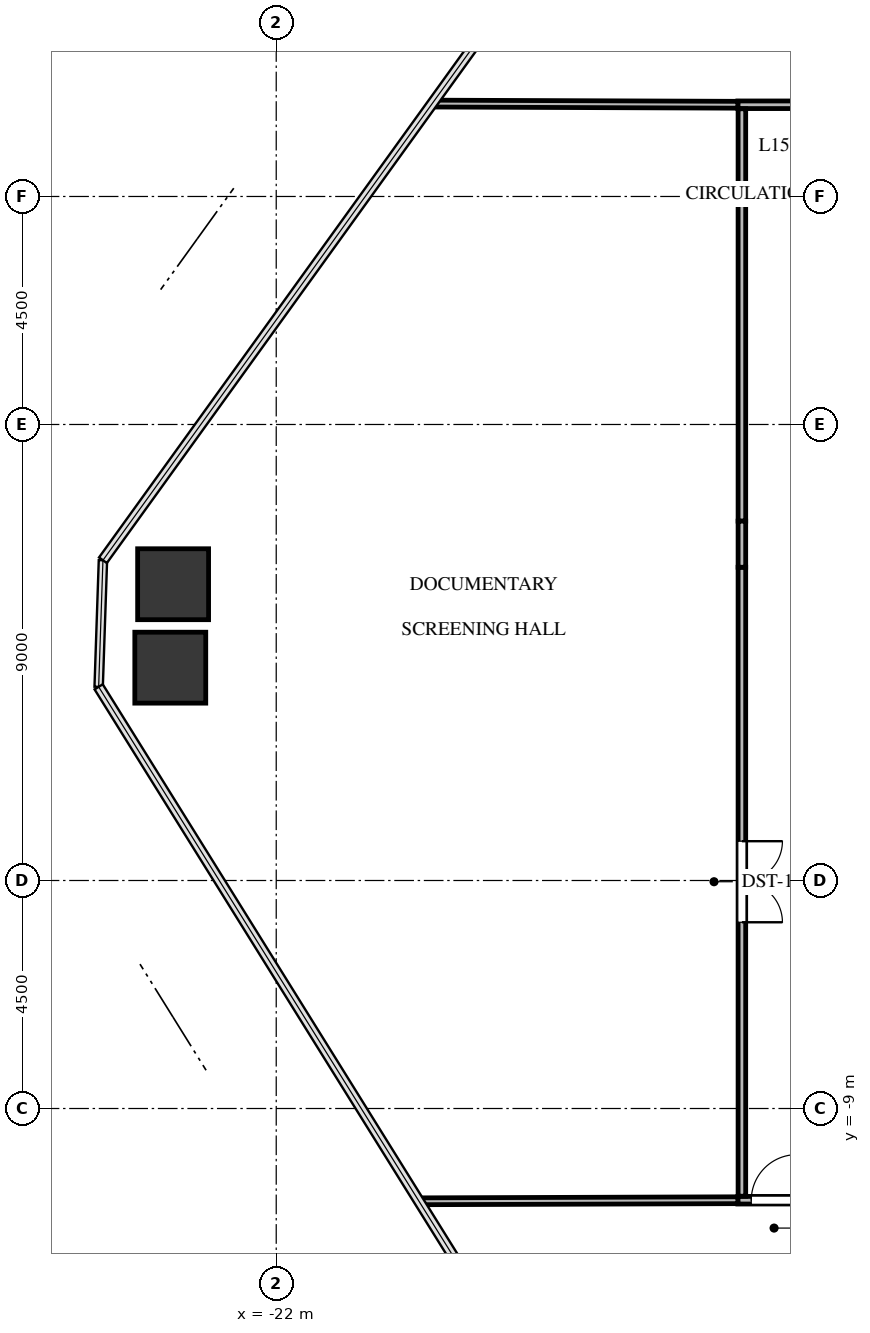
"""IFC4 building model, lengths in metres.
Left out: names, types, materials, properties, quantities, classifications, styles, units other than length and angle.
Written with IfcOpenShell. Run it as: python <this file> out.ifc"""

import sys

from ifc_helpers import new_model, si_unit, direction, frame, frame_2d, origin, origin_2d, place, context, subcontext, project, spatial, rectangle, extrude, source, transform, mapped, element, fill, save


model = new_model("IFC4")
c1 = context("Model", 3, precision=1e-05, world=origin(), true_north=direction((0.0, 1.0)))
c2 = subcontext(c1, "Body", "Model", "MODEL_VIEW")
j1 = project(units=[si_unit("LENGTHUNIT", "METRE"), si_unit("PLANEANGLEUNIT", "RADIAN")], contexts=[c1])
p1 = place(None, origin())
s1 = spatial("IfcSite", under=j1, at=p1, CompositionType="ELEMENT")
p2 = place(p1, origin())
s2 = spatial("IfcBuilding", under=s1, at=p2, CompositionType="ELEMENT")
p3 = place(p2, frame((0.0, 0.0, 62.1)))
s3 = spatial("IfcBuildingStorey", under=s2, at=p3, CompositionType="ELEMENT", Elevation=62.1)
m1 = source(origin(), c2, "Body", "SweptSolid", [
    extrude(rectangle(XDim=1.4, YDim=1.4, at=origin_2d()), origin(), (0.0, 0.0, 1.0), 3.3),
])
for number, where, z_axis, x_axis in (
    (1, (-24.091, -0.3, -0.24), (0.0, 0.0, 1.0), (1.0, 0.0, 0.0)),
    (2, (-24.035, 1.347, -0.24), (0.0, 0.0, 1.0), (1.0, 0.0, 0.0)),
):
    element("IfcColumn", number, at=place(p3, frame(where, z_axis=z_axis, x_axis=x_axis)), inside=s3, PredefinedType="COLUMN", context=c2, shape_type="MappedRepresentation", body=[
        mapped(m1, transform((0.0, 0.0, 0.0), x_axis=(1.0, 0.0, 0.0), y_axis=(0.0, 1.0, 0.0), z_axis=(0.0, 0.0, 1.0), scale=1.0)),
    ])
p4 = place(p3, frame((-10.72, 10.81, 0.0), z_axis=(0.0, 0.0, 1.0), x_axis=(-1.0, 0.0, 0.0)))
e3 = element("IfcWall", 3, at=p4, inside=s3, PredefinedType="PARTITIONING", context=c2, shape_type="SweptSolid", body=[
    extrude(rectangle(XDim=2.17, YDim=0.15, at=frame_2d((1.085, 0.0))), origin(), (0.0, 0.0, 1.0), 3.045),
])
p5 = place(p3, frame((-12.89, -10.81, 0.0), z_axis=(0.0, 0.0, 1.0), x_axis=(1.0, 0.0, 0.0)))
e4 = element("IfcWall", 4, at=p5, inside=s3, PredefinedType="PARTITIONING", context=c2, shape_type="SweptSolid", body=[
    extrude(rectangle(XDim=1.43, YDim=0.15, at=frame_2d((0.715, 0.0))), origin(), (0.0, 0.0, 1.0), 3.045),
])
p6 = place(p5, frame((0.265, 0.0, 0.0)))
e5 = element("IfcOpeningElement", 5, at=p6, cuts=e4, PredefinedType="OPENING", context=c2, shape_type="SweptSolid", body=[
    extrude(rectangle(XDim=0.9, YDim=2.05, at=frame_2d((0.45, 1.025))), frame((0.0, 0.085, 0.0), z_axis=(0.0, -1.0, 0.0), x_axis=(1.0, 0.0, 0.0)), (0.0, 0.0, 1.0), 0.17),
])
p7 = place(p3, frame((-12.81, 10.731, 0.0), z_axis=(0.0, 0.0, 1.0), x_axis=(0.0, -1.0, 0.0)))
e6 = element("IfcWall", 6, at=p7, inside=s3, PredefinedType="PARTITIONING", context=c2, shape_type="SweptSolid", body=[
    extrude(rectangle(XDim=8.139, YDim=0.15, at=frame_2d((4.069, 0.0))), origin(), (0.0, 0.0, 1.0), 3.045),
])
p8 = place(p3, frame((-12.81, 1.682, 0.0), z_axis=(0.0, 0.0, 1.0), x_axis=(0.0, -1.0, 0.0)))
e7 = element("IfcWall", 7, at=p8, inside=s3, PredefinedType="PARTITIONING", context=c2, shape_type="SweptSolid", body=[
    extrude(rectangle(XDim=12.413, YDim=0.15, at=frame_2d((6.207, 0.0))), origin(), (0.0, 0.0, 1.0), 3.045),
])
p9 = place(p8, frame((5.406, 0.0, 0.0)))
e8 = element("IfcOpeningElement", 8, at=p9, cuts=e7, PredefinedType="OPENING", context=c2, shape_type="SweptSolid", body=[
    extrude(rectangle(XDim=1.6, YDim=2.15, at=frame_2d((0.8, 1.075))), frame((0.0, 0.085, 0.0), z_axis=(0.0, -1.0, 0.0), x_axis=(1.0, 0.0, 0.0)), (0.0, 0.0, 1.0), 0.17),
])
p10 = place(p3, frame((-12.81, 2.592, 0.0), z_axis=(0.0, 0.0, 1.0), x_axis=(0.0, -1.0, 0.0)))
e9 = element("IfcWall", 9, at=p10, inside=s3, PredefinedType="PARTITIONING", context=c2, shape_type="SweptSolid", body=[
    extrude(rectangle(XDim=0.91, YDim=0.15, at=frame_2d((0.455, 0.0))), origin(), (0.0, 0.0, 1.0), 2.13),
])
p11 = place(p3, frame((-12.89, 10.81, 0.0), z_axis=(0.0, 0.0, 1.0), x_axis=(-0.999992607823, 0.003845035728, 0.0)))
e10 = element("IfcWall", 10, at=p11, inside=s3, PredefinedType="PARTITIONING", context=c2, shape_type="SweptSolid", body=[
    extrude(rectangle(XDim=6.032, YDim=0.135, at=frame_2d((3.016, 0.0))), origin(), (0.0, 0.0, 1.0), 2.38),
])
p12 = place(p3, frame((-19.182, -10.831, 0.0), z_axis=(0.0, 0.0, 1.0), x_axis=(0.999994432845, 0.003336806783, 0.0)))
e11 = element("IfcWall", 11, at=p12, inside=s3, PredefinedType="PARTITIONING", context=c2, shape_type="SweptSolid", body=[
    extrude(rectangle(XDim=6.292, YDim=0.135, at=frame_2d((3.146, 0.0))), origin(), (0.0, 0.0, 1.0), 2.38),
])
m2 = source(origin(), c2, "Body", "SweptSolid", [
    extrude(rectangle(XDim=0.9, YDim=2.05, at=frame_2d((0.45, 1.025))), frame((0.0, 0.025, 0.0), z_axis=(0.0, -1.0, 0.0), x_axis=(1.0, 0.0, 0.0)), (0.0, 0.0, 1.0), 0.05),
])
p13 = place(p6, origin())
e12 = element("IfcDoor", 12, at=p13, inside=s3, OperationType="SINGLE_SWING_RIGHT", PredefinedType="DOOR", context=c2, shape_type="MappedRepresentation", body=[
    mapped(m2, transform((0.0, 0.0, 0.0), x_axis=(1.0, 0.0, 0.0), y_axis=(0.0, 1.0, 0.0), z_axis=(0.0, 0.0, 1.0), scale=1.0)),
])
fill(e5, e12)
m3 = source(origin(), c2, "Body", "SweptSolid", [
    extrude(rectangle(XDim=1.6, YDim=2.15, at=frame_2d((0.8, 1.075))), frame((0.0, 0.025, 0.0), z_axis=(0.0, -1.0, 0.0), x_axis=(1.0, 0.0, 0.0)), (0.0, 0.0, 1.0), 0.05),
])
p14 = place(p9, origin())
e13 = element("IfcDoor", 13, at=p14, inside=s3, OperationType="DOUBLE_DOOR_SINGLE_SWING", PredefinedType="DOOR", context=c2, shape_type="MappedRepresentation", body=[
    mapped(m3, transform((0.0, 0.0, 0.0), x_axis=(1.0, 0.0, 0.0), y_axis=(0.0, 1.0, 0.0), z_axis=(0.0, 0.0, 1.0), scale=1.0)),
])
fill(e8, e13)
save(model, sys.argv[1])
